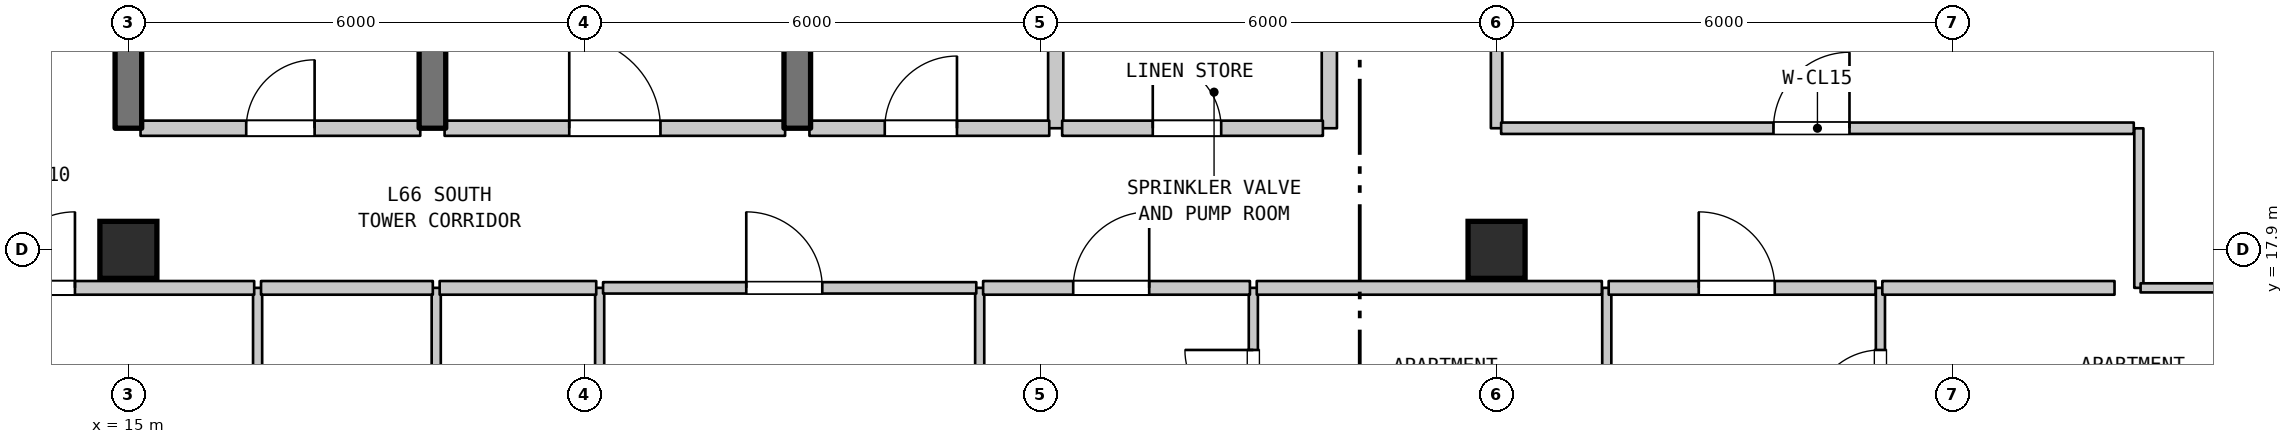
"""IFC4 building model, lengths in metres.
Left out: names, types, materials, properties, quantities, classifications, styles, units other than length and angle.
Written with IfcOpenShell. Run it as: python <this file> out.ifc"""

import sys

from ifc_helpers import new_model, si_unit, direction, frame, frame_2d, origin, origin_2d, place, context, subcontext, project, spatial, rectangle, extrude, element, fill, save


model = new_model("IFC4")
c1 = context("Model", 3, precision=1e-05, world=origin(), true_north=direction((0.0, 1.0)))
c2 = subcontext(c1, "Body", "Model", "MODEL_VIEW")
j1 = project(units=[si_unit("LENGTHUNIT", "METRE"), si_unit("PLANEANGLEUNIT", "RADIAN")], contexts=[c1])
p1 = place(None, origin())
s1 = spatial("IfcSite", under=j1, at=p1, CompositionType="ELEMENT")
p2 = place(p1, origin())
s2 = spatial("IfcBuilding", under=s1, at=p2, CompositionType="ELEMENT")
p3 = place(p2, frame((0.0, 0.0, 265.8)))
s3 = spatial("IfcBuildingStorey", under=s2, at=p3, CompositionType="ELEMENT", Elevation=265.8)
for number, where, z_axis, x_axis in (
    (1, (15.0, 17.9, 0.0), (0.0, 0.0, 1.0), (1.0, 0.0, 0.0)),
    (2, (33.0, 17.9, 0.0), (0.0, 0.0, 1.0), (1.0, 0.0, 0.0)),
):
    element("IfcColumn", number, at=place(p3, frame(where, z_axis=z_axis, x_axis=x_axis)), inside=s3, PredefinedType="COLUMN", context=c2, shape_type="SweptSolid", body=[
        extrude(rectangle(XDim=0.75, YDim=0.75, at=origin_2d()), origin(), (0.0, 0.0, 1.0), 3.7),
    ])
p4 = place(p3, frame((15.0, 19.5, 0.0), z_axis=(0.0, 0.0, 1.0), x_axis=(0.0, 1.0, 0.0)))
e3 = element("IfcWall", 3, at=p4, inside=s3, PredefinedType="SHEAR", context=c2, shape_type="SweptSolid", body=[
    extrude(rectangle(XDim=3.2, YDim=0.35, at=frame_2d((1.6, 0.0))), origin(), (0.0, 0.0, 1.0), 3.39),
])
p5 = place(p3, frame((16.7, 14.2, 0.0), z_axis=(0.0, 0.0, 1.0), x_axis=(0.0, 1.0, 0.0)))
e4 = element("IfcWall", 4, at=p5, inside=s3, PredefinedType="PARTITIONING", context=c2, shape_type="SweptSolid", body=[
    extrude(rectangle(XDim=3.2, YDim=0.12, at=frame_2d((1.6, 0.0))), origin(), (0.0, 0.0, 1.0), 3.39),
])
p6 = place(p5, frame((1.15, 0.0, 0.0)))
e5 = element("IfcOpeningElement", 5, at=p6, cuts=e4, PredefinedType="OPENING", context=c2, shape_type="SweptSolid", body=[
    extrude(rectangle(XDim=0.9, YDim=2.15, at=frame_2d((0.45, 1.075))), frame((0.0, 0.07, 0.0), z_axis=(0.0, -1.0, 0.0), x_axis=(1.0, 0.0, 0.0)), (0.0, 0.0, 1.0), 0.14),
])
p7 = place(p3, frame((19.0, 19.5, 0.0), z_axis=(0.0, 0.0, 1.0), x_axis=(0.0, 1.0, 0.0)))
e6 = element("IfcWall", 6, at=p7, inside=s3, PredefinedType="SHEAR", context=c2, shape_type="SweptSolid", body=[
    extrude(rectangle(XDim=3.2, YDim=0.35, at=frame_2d((1.6, 0.0))), origin(), (0.0, 0.0, 1.0), 3.39),
])
p8 = place(p3, frame((19.05, 14.2, 0.0), z_axis=(0.0, 0.0, 1.0), x_axis=(0.0, 1.0, 0.0)))
e7 = element("IfcWall", 7, at=p8, inside=s3, PredefinedType="PARTITIONING", context=c2, shape_type="SweptSolid", body=[
    extrude(rectangle(XDim=3.2, YDim=0.12, at=frame_2d((1.6, 0.0))), origin(), (0.0, 0.0, 1.0), 3.39),
])
p9 = place(p3, frame((21.2, 6.923, 0.0), z_axis=(0.0, 0.0, 1.0), x_axis=(0.0, 1.0, 0.0)))
e8 = element("IfcWall", 8, at=p9, inside=s3, PredefinedType="PARTITIONING", context=c2, shape_type="SweptSolid", body=[
    extrude(rectangle(XDim=10.477, YDim=0.12, at=frame_2d((5.238, 0.0))), origin(), (0.0, 0.0, 1.0), 3.39),
])
p10 = place(p3, frame((23.8, 19.5, 0.0), z_axis=(0.0, 0.0, 1.0), x_axis=(0.0, 1.0, 0.0)))
e9 = element("IfcWall", 9, at=p10, inside=s3, PredefinedType="SHEAR", context=c2, shape_type="SweptSolid", body=[
    extrude(rectangle(XDim=3.2, YDim=0.35, at=frame_2d((1.6, 0.0))), origin(), (0.0, 0.0, 1.0), 3.39),
])
p11 = place(p3, frame((26.2, 6.71, 0.0), z_axis=(0.0, 0.0, 1.0), x_axis=(0.0, 1.0, 0.0)))
e10 = element("IfcWall", 10, at=p11, inside=s3, PredefinedType="PARTITIONING", context=c2, shape_type="SweptSolid", body=[
    extrude(rectangle(XDim=10.69, YDim=0.12, at=frame_2d((5.345, 0.0))), origin(), (0.0, 0.0, 1.0), 3.39),
])
p12 = place(p3, frame((27.2, 19.5, 0.0), z_axis=(0.0, 0.0, 1.0), x_axis=(0.0, 1.0, 0.0)))
e11 = element("IfcWall", 11, at=p12, inside=s3, PredefinedType="STANDARD", context=c2, shape_type="SweptSolid", body=[
    extrude(rectangle(XDim=1.6, YDim=0.2, at=frame_2d((0.8, 0.0))), origin(), (0.0, 0.0, 1.0), 3.39),
])
p13 = place(p3, frame((29.8, 15.008, 0.0), z_axis=(0.0, 0.0, 1.0), x_axis=(0.0, 1.0, 0.0)))
e12 = element("IfcWall", 12, at=p13, inside=s3, PredefinedType="PARTITIONING", context=c2, shape_type="SweptSolid", body=[
    extrude(rectangle(XDim=2.392, YDim=0.12, at=frame_2d((1.196, 0.0))), origin(), (0.0, 0.0, 1.0), 3.39),
])
p14 = place(p13, frame((0.675, 0.0, 0.0)))
e13 = element("IfcOpeningElement", 13, at=p14, cuts=e12, PredefinedType="OPENING", context=c2, shape_type="SweptSolid", body=[
    extrude(rectangle(XDim=0.9, YDim=2.1, at=frame_2d((0.45, 1.05))), frame((0.0, 0.07, 0.0), z_axis=(0.0, -1.0, 0.0), x_axis=(1.0, 0.0, 0.0)), (0.0, 0.0, 1.0), 0.14),
])
p15 = place(p3, frame((30.8, 19.5, 0.0), z_axis=(0.0, 0.0, 1.0), x_axis=(0.0, 1.0, 0.0)))
e14 = element("IfcWall", 14, at=p15, inside=s3, PredefinedType="STANDARD", context=c2, shape_type="SweptSolid", body=[
    extrude(rectangle(XDim=1.6, YDim=0.2, at=frame_2d((0.8, 0.0))), origin(), (0.0, 0.0, 1.0), 3.39),
])
p16 = place(p3, frame((33.0, 19.5, 0.0), z_axis=(0.0, 0.0, 1.0), x_axis=(0.0, 1.0, 0.0)))
e15 = element("IfcWall", 15, at=p16, inside=s3, PredefinedType="STANDARD", context=c2, shape_type="SweptSolid", body=[
    extrude(rectangle(XDim=6.1, YDim=0.15, at=frame_2d((3.05, 0.0))), origin(), (0.0, 0.0, 1.0), 3.1),
])
p17 = place(p16, frame((1.545, 0.0, 0.0)))
e16 = element("IfcOpeningElement", 16, at=p17, cuts=e15, PredefinedType="OPENING", context=c2, shape_type="SweptSolid", body=[
    extrude(rectangle(XDim=1.0, YDim=2.15, at=frame_2d((0.5, 1.075))), frame((0.0, 0.085, 0.0), z_axis=(0.0, -1.0, 0.0), x_axis=(1.0, 0.0, 0.0)), (0.0, 0.0, 1.0), 0.17),
])
p18 = place(p3, frame((34.45, 15.008, 0.0), z_axis=(0.0, 0.0, 1.0), x_axis=(0.0, 1.0, 0.0)))
e17 = element("IfcWall", 17, at=p18, inside=s3, PredefinedType="PARTITIONING", context=c2, shape_type="SweptSolid", body=[
    extrude(rectangle(XDim=2.392, YDim=0.12, at=frame_2d((1.196, 0.0))), origin(), (0.0, 0.0, 1.0), 3.39),
])
p19 = place(p3, frame((38.05, 15.008, 0.0), z_axis=(0.0, 0.0, 1.0), x_axis=(0.0, 1.0, 0.0)))
e18 = element("IfcWall", 18, at=p19, inside=s3, PredefinedType="PARTITIONING", context=c2, shape_type="SweptSolid", body=[
    extrude(rectangle(XDim=2.392, YDim=0.12, at=frame_2d((1.196, 0.0))), origin(), (0.0, 0.0, 1.0), 3.39),
])
p20 = place(p19, frame((0.675, 0.0, 0.0)))
e19 = element("IfcOpeningElement", 19, at=p20, cuts=e18, PredefinedType="OPENING", context=c2, shape_type="SweptSolid", body=[
    extrude(rectangle(XDim=0.9, YDim=2.1, at=frame_2d((0.45, 1.05))), frame((0.0, 0.07, 0.0), z_axis=(0.0, -1.0, 0.0), x_axis=(1.0, 0.0, 0.0)), (0.0, 0.0, 1.0), 0.14),
])
p21 = place(p3, frame((41.45, 17.4, 0.0), z_axis=(0.0, 0.0, 1.0), x_axis=(0.0, 1.0, 0.0)))
e20 = element("IfcWall", 20, at=p21, inside=s3, PredefinedType="PARTITIONING", context=c2, shape_type="SweptSolid", body=[
    extrude(rectangle(XDim=2.099, YDim=0.12, at=frame_2d((1.05, 0.0))), origin(), (0.0, 0.0, 1.0), 3.39),
])
p22 = place(p3, frame((12.975, 17.4, 0.0), z_axis=(0.0, 0.0, 1.0), x_axis=(1.0, 0.0, 0.0)))
e21 = element("IfcWall", 21, at=p22, inside=s3, PredefinedType="STANDARD", context=c2, shape_type="SweptSolid", body=[
    extrude(rectangle(XDim=3.68, YDim=0.18, at=frame_2d((1.84, 0.0))), origin(), (0.0, 0.0, 1.0), 3.39),
])
p23 = place(p22, frame((0.322, 0.0, 0.0)))
e22 = element("IfcOpeningElement", 22, at=p23, cuts=e21, PredefinedType="OPENING", context=c2, shape_type="SweptSolid", body=[
    extrude(rectangle(XDim=1.0, YDim=2.15, at=frame_2d((0.5, 1.075))), frame((0.0, 0.1, 0.0), z_axis=(0.0, -1.0, 0.0), x_axis=(1.0, 0.0, 0.0)), (0.0, 0.0, 1.0), 0.2),
])
p24 = place(p3, frame((16.745, 17.4, 0.0), z_axis=(0.0, 0.0, 1.0), x_axis=(1.0, 0.0, 0.0)))
e23 = element("IfcWall", 23, at=p24, inside=s3, PredefinedType="STANDARD", context=c2, shape_type="SweptSolid", body=[
    extrude(rectangle(XDim=2.26, YDim=0.18, at=frame_2d((1.13, 0.0))), origin(), (0.0, 0.0, 1.0), 3.39),
])
p25 = place(p3, frame((19.095, 17.4, 0.0), z_axis=(0.0, 0.0, 1.0), x_axis=(1.0, 0.0, 0.0)))
e24 = element("IfcWall", 24, at=p25, inside=s3, PredefinedType="STANDARD", context=c2, shape_type="SweptSolid", body=[
    extrude(rectangle(XDim=2.06, YDim=0.18, at=frame_2d((1.03, 0.0))), origin(), (0.0, 0.0, 1.0), 3.39),
])
p26 = place(p3, frame((21.245, 17.4, 0.0), z_axis=(0.0, 0.0, 1.0), x_axis=(1.0, 0.0, 0.0)))
e25 = element("IfcWall", 25, at=p26, inside=s3, PredefinedType="STANDARD", context=c2, shape_type="SweptSolid", body=[
    extrude(rectangle(XDim=4.91, YDim=0.15, at=frame_2d((2.455, 0.0))), origin(), (0.0, 0.0, 1.0), 3.39),
])
p27 = place(p26, frame((1.884, 0.0, 0.0)))
e26 = element("IfcOpeningElement", 26, at=p27, cuts=e25, PredefinedType="OPENING", context=c2, shape_type="SweptSolid", body=[
    extrude(rectangle(XDim=1.0, YDim=2.15, at=frame_2d((0.5, 1.075))), frame((0.0, 0.085, 0.0), z_axis=(0.0, -1.0, 0.0), x_axis=(1.0, 0.0, 0.0)), (0.0, 0.0, 1.0), 0.17),
])
p28 = place(p3, frame((26.245, 17.4, 0.0), z_axis=(0.0, 0.0, 1.0), x_axis=(1.0, 0.0, 0.0)))
e27 = element("IfcWall", 27, at=p28, inside=s3, PredefinedType="STANDARD", context=c2, shape_type="SweptSolid", body=[
    extrude(rectangle(XDim=3.51, YDim=0.18, at=frame_2d((1.755, 0.0))), origin(), (0.0, 0.0, 1.0), 3.39),
])
p29 = place(p28, frame((1.185, 0.0, 0.0)))
e28 = element("IfcOpeningElement", 28, at=p29, cuts=e27, PredefinedType="OPENING", context=c2, shape_type="SweptSolid", body=[
    extrude(rectangle(XDim=1.0, YDim=2.15, at=frame_2d((0.5, 1.075))), frame((0.0, 0.1, 0.0), z_axis=(0.0, -1.0, 0.0), x_axis=(1.0, 0.0, 0.0)), (0.0, 0.0, 1.0), 0.2),
])
p30 = place(p3, frame((29.845, 17.4, 0.0), z_axis=(0.0, 0.0, 1.0), x_axis=(1.0, 0.0, 0.0)))
e29 = element("IfcWall", 29, at=p30, inside=s3, PredefinedType="STANDARD", context=c2, shape_type="SweptSolid", body=[
    extrude(rectangle(XDim=4.54, YDim=0.18, at=frame_2d((2.27, 0.0))), origin(), (0.0, 0.0, 1.0), 3.39),
])
p31 = place(p3, frame((34.475, 17.4, 0.0), z_axis=(0.0, 0.0, 1.0), x_axis=(1.0, 0.0, 0.0)))
e30 = element("IfcWall", 30, at=p31, inside=s3, PredefinedType="STANDARD", context=c2, shape_type="SweptSolid", body=[
    extrude(rectangle(XDim=3.51, YDim=0.18, at=frame_2d((1.755, 0.0))), origin(), (0.0, 0.0, 1.0), 3.39),
])
p32 = place(p31, frame((1.185, 0.0, 0.0)))
e31 = element("IfcOpeningElement", 31, at=p32, cuts=e30, PredefinedType="OPENING", context=c2, shape_type="SweptSolid", body=[
    extrude(rectangle(XDim=1.0, YDim=2.15, at=frame_2d((0.5, 1.075))), frame((0.0, 0.1, 0.0), z_axis=(0.0, -1.0, 0.0), x_axis=(1.0, 0.0, 0.0)), (0.0, 0.0, 1.0), 0.2),
])
p33 = place(p3, frame((38.075, 17.4, 0.0), z_axis=(0.0, 0.0, 1.0), x_axis=(1.0, 0.0, 0.0)))
e32 = element("IfcWall", 32, at=p33, inside=s3, PredefinedType="STANDARD", context=c2, shape_type="SweptSolid", body=[
    extrude(rectangle(XDim=3.055, YDim=0.18, at=frame_2d((1.527, 0.0))), origin(), (0.0, 0.0, 1.0), 3.39),
])
p34 = place(p3, frame((41.473, 17.4, 0.0), z_axis=(0.0, 0.0, 1.0), x_axis=(1.0, 0.0, 0.0)))
e33 = element("IfcWall", 33, at=p34, inside=s3, PredefinedType="PARTITIONING", context=c2, shape_type="SweptSolid", body=[
    extrude(rectangle(XDim=2.031, YDim=0.12, at=frame_2d((1.016, 0.0))), origin(), (0.0, 0.0, 1.0), 3.39),
])
p35 = place(p3, frame((15.16, 19.5, 0.0), z_axis=(0.0, 0.0, 1.0), x_axis=(1.0, 0.0, 0.0)))
e34 = element("IfcWall", 34, at=p35, inside=s3, PredefinedType="STANDARD", context=c2, shape_type="SweptSolid", body=[
    extrude(rectangle(XDim=3.68, YDim=0.2, at=frame_2d((1.84, 0.0))), origin(), (0.0, 0.0, 1.0), 3.39),
])
p36 = place(p35, frame((1.39, 0.0, 0.0)))
e35 = element("IfcOpeningElement", 35, at=p36, cuts=e34, PredefinedType="OPENING", context=c2, shape_type="SweptSolid", body=[
    extrude(rectangle(XDim=0.9, YDim=2.15, at=frame_2d((0.45, 1.075))), frame((0.0, 0.11, 0.0), z_axis=(0.0, -1.0, 0.0), x_axis=(1.0, 0.0, 0.0)), (0.0, 0.0, 1.0), 0.22),
])
p37 = place(p3, frame((19.16, 19.5, 0.0), z_axis=(0.0, 0.0, 1.0), x_axis=(1.0, 0.0, 0.0)))
e36 = element("IfcWall", 36, at=p37, inside=s3, PredefinedType="STANDARD", context=c2, shape_type="SweptSolid", body=[
    extrude(rectangle(XDim=4.48, YDim=0.2, at=frame_2d((2.24, 0.0))), origin(), (0.0, 0.0, 1.0), 3.39),
])
p38 = place(p37, frame((1.64, 0.0, 0.0)))
e37 = element("IfcOpeningElement", 37, at=p38, cuts=e36, PredefinedType="OPENING", context=c2, shape_type="SweptSolid", body=[
    extrude(rectangle(XDim=1.2, YDim=2.2, at=frame_2d((0.6, 1.1))), frame((0.0, 0.11, 0.0), z_axis=(0.0, -1.0, 0.0), x_axis=(1.0, 0.0, 0.0)), (0.0, 0.0, 1.0), 0.22),
])
p39 = place(p3, frame((23.96, 19.5, 0.0), z_axis=(0.0, 0.0, 1.0), x_axis=(1.0, 0.0, 0.0)))
e38 = element("IfcWall", 38, at=p39, inside=s3, PredefinedType="STANDARD", context=c2, shape_type="SweptSolid", body=[
    extrude(rectangle(XDim=3.155, YDim=0.2, at=frame_2d((1.578, 0.0))), origin(), (0.0, 0.0, 1.0), 3.39),
])
p40 = place(p39, frame((0.991, 0.0, 0.0)))
e39 = element("IfcOpeningElement", 39, at=p40, cuts=e38, PredefinedType="OPENING", context=c2, shape_type="SweptSolid", body=[
    extrude(rectangle(XDim=0.95, YDim=2.15, at=frame_2d((0.475, 1.075))), frame((0.0, 0.11, 0.0), z_axis=(0.0, -1.0, 0.0), x_axis=(1.0, 0.0, 0.0)), (0.0, 0.0, 1.0), 0.22),
])
p41 = place(p3, frame((27.285, 19.5, 0.0), z_axis=(0.0, 0.0, 1.0), x_axis=(1.0, 0.0, 0.0)))
e40 = element("IfcWall", 40, at=p41, inside=s3, PredefinedType="STANDARD", context=c2, shape_type="SweptSolid", body=[
    extrude(rectangle(XDim=3.43, YDim=0.2, at=frame_2d((1.715, 0.0))), origin(), (0.0, 0.0, 1.0), 3.39),
])
p42 = place(p41, frame((1.192, 0.0, 0.0)))
e41 = element("IfcOpeningElement", 41, at=p42, cuts=e40, PredefinedType="OPENING", context=c2, shape_type="SweptSolid", body=[
    extrude(rectangle(XDim=0.9, YDim=2.15, at=frame_2d((0.45, 1.075))), frame((0.0, 0.11, 0.0), z_axis=(0.0, -1.0, 0.0), x_axis=(1.0, 0.0, 0.0)), (0.0, 0.0, 1.0), 0.22),
])
p43 = place(p3, frame((33.06, 19.5, 0.0), z_axis=(0.0, 0.0, 1.0), x_axis=(1.0, 0.0, 0.0)))
e42 = element("IfcWall", 42, at=p43, inside=s3, PredefinedType="STANDARD", context=c2, shape_type="SweptSolid", body=[
    extrude(rectangle(XDim=8.323, YDim=0.15, at=frame_2d((4.162, 0.0))), origin(), (0.0, 0.0, 1.0), 3.39),
])
p44 = place(p43, frame((3.583, 0.0, 0.0)))
e43 = element("IfcOpeningElement", 43, at=p44, cuts=e42, PredefinedType="OPENING", context=c2, shape_type="SweptSolid", body=[
    extrude(rectangle(XDim=1.0, YDim=2.15, at=frame_2d((0.5, 1.075))), frame((0.0, 0.085, 0.0), z_axis=(0.0, -1.0, 0.0), x_axis=(1.0, 0.0, 0.0)), (0.0, 0.0, 1.0), 0.17),
])
p45 = place(p14, origin())
e44 = element("IfcDoor", 44, at=p45, inside=s3, OperationType="SINGLE_SWING_RIGHT", PredefinedType="DOOR", context=c2, shape_type="SweptSolid", body=[
    extrude(rectangle(XDim=0.9, YDim=2.1, at=frame_2d((0.45, 1.05))), frame((0.0, 0.025, 0.0), z_axis=(0.0, -1.0, 0.0), x_axis=(1.0, 0.0, 0.0)), (0.0, 0.0, 1.0), 0.05),
])
fill(e13, e44)
p46 = place(p20, origin())
e45 = element("IfcDoor", 45, at=p46, inside=s3, OperationType="SINGLE_SWING_LEFT", PredefinedType="DOOR", context=c2, shape_type="SweptSolid", body=[
    extrude(rectangle(XDim=0.9, YDim=2.1, at=frame_2d((0.45, 1.05))), frame((0.0, 0.025, 0.0), z_axis=(0.0, -1.0, 0.0), x_axis=(1.0, 0.0, 0.0)), (0.0, 0.0, 1.0), 0.05),
])
fill(e19, e45)
p47 = place(p23, origin())
e46 = element("IfcDoor", 46, at=p47, inside=s3, OperationType="SINGLE_SWING_RIGHT", PredefinedType="DOOR", context=c2, shape_type="SweptSolid", body=[
    extrude(rectangle(XDim=1.0, YDim=2.15, at=frame_2d((0.5, 1.075))), frame((0.0, 0.025, 0.0), z_axis=(0.0, -1.0, 0.0), x_axis=(1.0, 0.0, 0.0)), (0.0, 0.0, 1.0), 0.05),
])
fill(e22, e46)
p48 = place(p27, origin())
e47 = element("IfcDoor", 47, at=p48, inside=s3, OperationType="SINGLE_SWING_LEFT", PredefinedType="DOOR", context=c2, shape_type="SweptSolid", body=[
    extrude(rectangle(XDim=1.0, YDim=2.15, at=frame_2d((0.5, 1.075))), frame((0.0, 0.025, 0.0), z_axis=(0.0, -1.0, 0.0), x_axis=(1.0, 0.0, 0.0)), (0.0, 0.0, 1.0), 0.05),
])
fill(e26, e47)
p49 = place(p29, origin())
e48 = element("IfcDoor", 48, at=p49, inside=s3, OperationType="SINGLE_SWING_RIGHT", PredefinedType="DOOR", context=c2, shape_type="SweptSolid", body=[
    extrude(rectangle(XDim=1.0, YDim=2.15, at=frame_2d((0.5, 1.075))), frame((0.0, 0.025, 0.0), z_axis=(0.0, -1.0, 0.0), x_axis=(1.0, 0.0, 0.0)), (0.0, 0.0, 1.0), 0.05),
])
fill(e28, e48)
p50 = place(p32, origin())
e49 = element("IfcDoor", 49, at=p50, inside=s3, OperationType="SINGLE_SWING_LEFT", PredefinedType="DOOR", context=c2, shape_type="SweptSolid", body=[
    extrude(rectangle(XDim=1.0, YDim=2.15, at=frame_2d((0.5, 1.075))), frame((0.0, 0.025, 0.0), z_axis=(0.0, -1.0, 0.0), x_axis=(1.0, 0.0, 0.0)), (0.0, 0.0, 1.0), 0.05),
])
fill(e31, e49)
p51 = place(p36, origin())
e50 = element("IfcDoor", 50, at=p51, inside=s3, OperationType="SINGLE_SWING_RIGHT", PredefinedType="DOOR", context=c2, shape_type="SweptSolid", body=[
    extrude(rectangle(XDim=0.9, YDim=2.15, at=frame_2d((0.45, 1.075))), frame((0.0, 0.025, 0.0), z_axis=(0.0, -1.0, 0.0), x_axis=(1.0, 0.0, 0.0)), (0.0, 0.0, 1.0), 0.05),
])
fill(e35, e50)
p52 = place(p38, origin())
e51 = element("IfcDoor", 51, at=p52, inside=s3, OperationType="SINGLE_SWING_LEFT", PredefinedType="DOOR", context=c2, shape_type="SweptSolid", body=[
    extrude(rectangle(XDim=1.2, YDim=2.2, at=frame_2d((0.6, 1.1))), frame((0.0, 0.025, 0.0), z_axis=(0.0, -1.0, 0.0), x_axis=(1.0, 0.0, 0.0)), (0.0, 0.0, 1.0), 0.05),
])
fill(e37, e51)
p53 = place(p40, origin())
e52 = element("IfcDoor", 52, at=p53, inside=s3, OperationType="SINGLE_SWING_RIGHT", PredefinedType="DOOR", context=c2, shape_type="SweptSolid", body=[
    extrude(rectangle(XDim=0.95, YDim=2.15, at=frame_2d((0.475, 1.075))), frame((0.0, 0.025, 0.0), z_axis=(0.0, -1.0, 0.0), x_axis=(1.0, 0.0, 0.0)), (0.0, 0.0, 1.0), 0.05),
])
fill(e39, e52)
p54 = place(p42, origin())
e53 = element("IfcDoor", 53, at=p54, inside=s3, OperationType="SINGLE_SWING_LEFT", PredefinedType="DOOR", context=c2, shape_type="SweptSolid", body=[
    extrude(rectangle(XDim=0.9, YDim=2.15, at=frame_2d((0.45, 1.075))), frame((0.0, 0.025, 0.0), z_axis=(0.0, -1.0, 0.0), x_axis=(1.0, 0.0, 0.0)), (0.0, 0.0, 1.0), 0.05),
])
fill(e41, e53)
p55 = place(p44, origin())
e54 = element("IfcDoor", 54, at=p55, inside=s3, OperationType="SINGLE_SWING_RIGHT", PredefinedType="DOOR", context=c2, shape_type="SweptSolid", body=[
    extrude(rectangle(XDim=1.0, YDim=2.15, at=frame_2d((0.5, 1.075))), frame((0.0, 0.025, 0.0), z_axis=(0.0, -1.0, 0.0), x_axis=(1.0, 0.0, 0.0)), (0.0, 0.0, 1.0), 0.05),
])
fill(e43, e54)
save(model, sys.argv[1])
